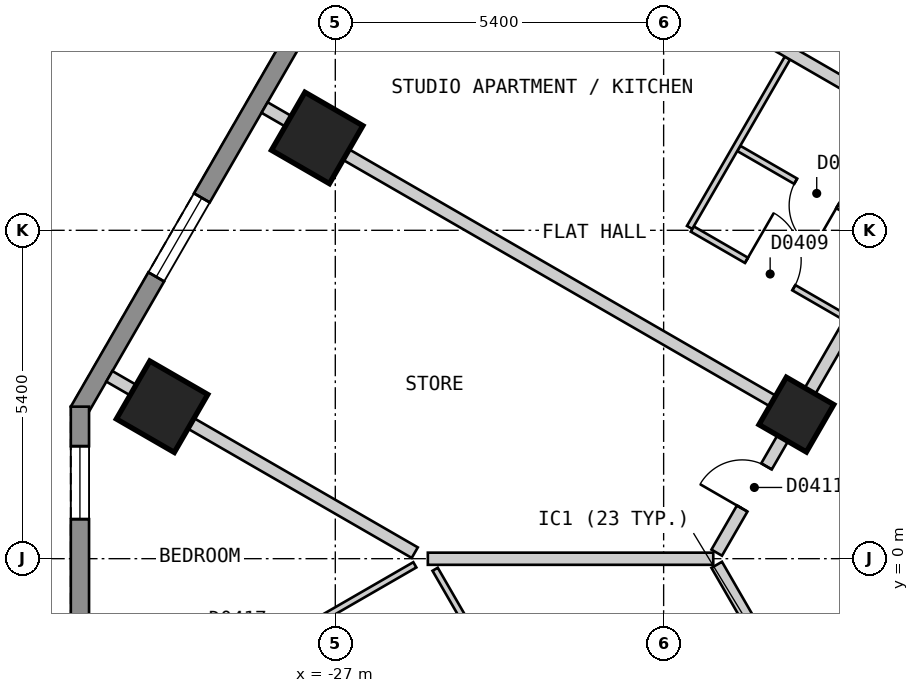
"""IFC4 building model, lengths in metres.
Left out: names, types, materials, properties, quantities, classifications, styles, units other than length and angle.
Written with IfcOpenShell. Run it as: python <this file> out.ifc"""

import sys

from ifc_helpers import new_model, si_unit, direction, frame, frame_2d, origin, origin_2d, place, context, subcontext, project, spatial, polyline, rectangle, outline, extrude, element, fill, save


model = new_model("IFC4")
c1 = context("Model", 3, precision=1e-05, world=origin(), true_north=direction((0.0, 1.0)))
c2 = subcontext(c1, "Body", "Model", "MODEL_VIEW")
j1 = project(units=[si_unit("LENGTHUNIT", "METRE"), si_unit("PLANEANGLEUNIT", "RADIAN")], contexts=[c1])
p1 = place(None, origin())
s1 = spatial("IfcSite", under=j1, at=p1, CompositionType="ELEMENT")
p2 = place(p1, origin())
s2 = spatial("IfcBuilding", under=s1, at=p2, CompositionType="ELEMENT")
p3 = place(p2, frame((0.0, 0.0, 32.4)))
s3 = spatial("IfcBuildingStorey", under=s2, at=p3, CompositionType="ELEMENT", Elevation=32.4)
for number, where, z_axis, x_axis in (
    (1, (-27.298, 6.919, 0.0), (0.0, 0.0, 1.0), (-0.5, -0.866, 0.0)),
    (2, (-29.849, 2.499, 0.0), (0.0, 0.0, 1.0), (-0.5, -0.866, 0.0)),
):
    element("IfcColumn", number, at=place(p3, frame(where, z_axis=z_axis, x_axis=x_axis)), inside=s3, PredefinedType="COLUMN", context=c2, shape_type="SweptSolid", body=[
        extrude(rectangle(XDim=1.1, YDim=1.1, at=origin_2d()), origin(), (0.0, 0.0, 1.0), 3.0),
    ])
p4 = place(p3, frame((-19.417, 2.369, 0.0), z_axis=(0.0, 0.0, 1.0), x_axis=(-0.499984884929, -0.866034130299, 0.0)))
e3 = element("IfcColumn", 3, at=p4, inside=s3, PredefinedType="COLUMN", context=c2, shape_type="SweptSolid", body=[
    extrude(rectangle(XDim=0.9, YDim=0.9, at=origin_2d()), origin(), (0.0, 0.0, 1.0), 3.0),
])
p5 = place(p3, frame((-17.71, 25.825, 0.0), z_axis=(0.0, 0.0, 1.0), x_axis=(-0.500001938803, -0.866024284413, 0.0)))
e4 = element("IfcWall", 4, at=p5, inside=s3, PredefinedType="SOLIDWALL", context=c2, shape_type="SweptSolid", body=[
    extrude(outline(polyline([(0.0, -0.15), (27.02, -0.15), (26.94, 0.15), (0.08, 0.15), (0.0, -0.15)])), origin(), (0.0, 0.0, 1.0), 2.7),
])
p6 = place(p5, frame((2.553, 0.0, 0.15)))
e5 = element("IfcOpeningElement", 5, at=p6, cuts=e4, PredefinedType="OPENING", context=c2, shape_type="SweptSolid", body=[
    extrude(rectangle(XDim=1.5, YDim=2.1, at=frame_2d((0.75, 1.05))), frame((0.0, 0.16, 0.0), z_axis=(0.0, -1.0, 0.0), x_axis=(1.0, 0.0, 0.0)), (0.0, 0.0, 1.0), 0.32),
])
p7 = place(p5, frame((7.658, 0.0, 0.15)))
e6 = element("IfcOpeningElement", 6, at=p7, cuts=e4, PredefinedType="OPENING", context=c2, shape_type="SweptSolid", body=[
    extrude(rectangle(XDim=1.5, YDim=2.1, at=frame_2d((0.75, 1.05))), frame((0.0, 0.16, 0.0), z_axis=(0.0, -1.0, 0.0), x_axis=(1.0, 0.0, 0.0)), (0.0, 0.0, 1.0), 0.32),
])
p8 = place(p5, frame((12.761, 0.0, 0.15)))
e7 = element("IfcOpeningElement", 7, at=p8, cuts=e4, PredefinedType="OPENING", context=c2, shape_type="SweptSolid", body=[
    extrude(rectangle(XDim=1.5, YDim=2.1, at=frame_2d((0.75, 1.05))), frame((0.0, 0.16, 0.0), z_axis=(0.0, -1.0, 0.0), x_axis=(1.0, 0.0, 0.0)), (0.0, 0.0, 1.0), 0.32),
])
p9 = place(p5, frame((17.865, 0.0, 0.15)))
e8 = element("IfcOpeningElement", 8, at=p9, cuts=e4, PredefinedType="OPENING", context=c2, shape_type="SweptSolid", body=[
    extrude(rectangle(XDim=1.5, YDim=2.1, at=frame_2d((0.75, 1.05))), frame((0.0, 0.16, 0.0), z_axis=(0.0, -1.0, 0.0), x_axis=(1.0, 0.0, 0.0)), (0.0, 0.0, 1.0), 0.32),
])
p10 = place(p5, frame((22.969, 0.0, 0.15)))
e9 = element("IfcOpeningElement", 9, at=p10, cuts=e4, PredefinedType="OPENING", context=c2, shape_type="SweptSolid", body=[
    extrude(rectangle(XDim=1.5, YDim=2.1, at=frame_2d((0.75, 1.05))), frame((0.0, 0.16, 0.0), z_axis=(0.0, -1.0, 0.0), x_axis=(1.0, 0.0, 0.0)), (0.0, 0.0, 1.0), 0.32),
])
p11 = place(p3, frame((-31.2, 2.5, 0.0), z_axis=(0.0, 0.0, 1.0), x_axis=(0.0, -1.0, 0.0)))
e10 = element("IfcWall", 10, at=p11, inside=s3, PredefinedType="SOLIDWALL", context=c2, shape_type="SweptSolid", body=[
    extrude(outline(polyline([(0.0, -0.15), (5.0, -0.15), (4.92, 0.15), (0.08, 0.15), (0.0, -0.15)])), origin(), (0.0, 0.0, 1.0), 2.7),
])
p12 = place(p11, frame((0.65, 0.0, 0.15)))
e11 = element("IfcOpeningElement", 11, at=p12, cuts=e10, PredefinedType="OPENING", context=c2, shape_type="SweptSolid", body=[
    extrude(rectangle(XDim=1.2, YDim=2.1, at=frame_2d((0.6, 1.05))), frame((0.0, 0.16, 0.0), z_axis=(0.0, -1.0, 0.0), x_axis=(1.0, 0.0, 0.0)), (0.0, 0.0, 1.0), 0.32),
])
p13 = place(p3, frame((-20.727, -0.101, 0.0), z_axis=(0.0, 0.0, 1.0), x_axis=(0.500049702773, -0.865996705973, 0.0)))
e12 = element("IfcWall", 12, at=p13, inside=s3, PredefinedType="PARTITIONING", context=c2, shape_type="SweptSolid", body=[
    extrude(rectangle(XDim=7.211, YDim=0.2, at=frame_2d((3.605, 0.0))), origin(), (0.0, 0.0, 1.0), 2.7),
])
p14 = place(p13, frame((5.654, 0.0, 0.0)))
e13 = element("IfcOpeningElement", 13, at=p14, cuts=e12, PredefinedType="OPENING", context=c2, shape_type="SweptSolid", body=[
    extrude(rectangle(XDim=1.0, YDim=2.1, at=frame_2d((0.5, 1.05))), frame((0.0, 0.11, 0.0), z_axis=(0.0, -1.0, 0.0), x_axis=(1.0, 0.0, 0.0)), (0.0, 0.0, 1.0), 0.22),
])
p15 = place(p3, frame((-20.727, 0.099, 0.0), z_axis=(0.0, 0.0, 1.0), x_axis=(0.499993204491, 0.866029327138, 0.0)))
e14 = element("IfcWall", 14, at=p15, inside=s3, PredefinedType="PARTITIONING", context=c2, shape_type="SweptSolid", body=[
    extrude(rectangle(XDim=20.554, YDim=0.2, at=frame_2d((10.277, 0.0))), origin(), (0.0, 0.0, 1.0), 2.7),
])
p16 = place(p15, frame((18.916, 0.0, 0.0)))
e15 = element("IfcOpeningElement", 15, at=p16, cuts=e14, PredefinedType="OPENING", context=c2, shape_type="SweptSolid", body=[
    extrude(rectangle(XDim=0.8, YDim=2.1, at=frame_2d((0.4, 1.05))), frame((0.0, 0.11, 0.0), z_axis=(0.0, -1.0, 0.0), x_axis=(1.0, 0.0, 0.0)), (0.0, 0.0, 1.0), 0.22),
])
p17 = place(p15, frame((14.88, 0.0, 0.0)))
e16 = element("IfcOpeningElement", 16, at=p17, cuts=e14, PredefinedType="OPENING", context=c2, shape_type="SweptSolid", body=[
    extrude(rectangle(XDim=1.0, YDim=2.1, at=frame_2d((0.5, 1.05))), frame((0.0, 0.11, 0.0), z_axis=(0.0, -1.0, 0.0), x_axis=(1.0, 0.0, 0.0)), (0.0, 0.0, 1.0), 0.22),
])
p18 = place(p15, frame((9.776, 0.0, 0.0)))
e17 = element("IfcOpeningElement", 17, at=p18, cuts=e14, PredefinedType="OPENING", context=c2, shape_type="SweptSolid", body=[
    extrude(rectangle(XDim=1.0, YDim=2.1, at=frame_2d((0.5, 1.05))), frame((0.0, 0.11, 0.0), z_axis=(0.0, -1.0, 0.0), x_axis=(1.0, 0.0, 0.0)), (0.0, 0.0, 1.0), 0.22),
])
p19 = place(p15, frame((4.673, 0.0, 0.0)))
e18 = element("IfcOpeningElement", 18, at=p19, cuts=e14, PredefinedType="OPENING", context=c2, shape_type="SweptSolid", body=[
    extrude(rectangle(XDim=1.0, YDim=2.1, at=frame_2d((0.5, 1.05))), frame((0.0, 0.11, 0.0), z_axis=(0.0, -1.0, 0.0), x_axis=(1.0, 0.0, 0.0)), (0.0, 0.0, 1.0), 0.22),
])
p20 = place(p15, frame((0.838, 0.0, 0.0)))
e19 = element("IfcOpeningElement", 19, at=p20, cuts=e14, PredefinedType="OPENING", context=c2, shape_type="SweptSolid", body=[
    extrude(rectangle(XDim=0.8, YDim=2.1, at=frame_2d((0.4, 1.05))), frame((0.0, 0.11, 0.0), z_axis=(0.0, -1.0, 0.0), x_axis=(1.0, 0.0, 0.0)), (0.0, 0.0, 1.0), 0.22),
])
p21 = place(p3, frame((-25.358, -0.174, 0.0), z_axis=(0.0, 0.0, 1.0), x_axis=(0.500093956194, -0.865971151354, 0.0)))
e20 = element("IfcWall", 20, at=p21, inside=s3, PredefinedType="PARTITIONING", context=c2, shape_type="SweptSolid", body=[
    extrude(rectangle(XDim=4.873, YDim=0.1, at=frame_2d((2.437, 0.0))), origin(), (0.0, 0.0, 1.0), 2.7),
])
p22 = place(p21, frame((1.937, 0.0, 0.0)))
e21 = element("IfcOpeningElement", 21, at=p22, cuts=e20, PredefinedType="OPENING", context=c2, shape_type="SweptSolid", body=[
    extrude(rectangle(XDim=0.8, YDim=2.1, at=frame_2d((0.4, 1.05))), frame((0.0, 0.06, 0.0), z_axis=(0.0, -1.0, 0.0), x_axis=(1.0, 0.0, 0.0)), (0.0, 0.0, 1.0), 0.12),
])
p23 = place(p3, frame((-20.364, 6.747, 0.0), z_axis=(0.0, 0.0, 1.0), x_axis=(0.866003949776, -0.500037157592, 0.0)))
e22 = element("IfcWall", 22, at=p23, inside=s3, PredefinedType="PARTITIONING", context=c2, shape_type="SweptSolid", body=[
    extrude(rectangle(XDim=2.91, YDim=0.1, at=frame_2d((1.455, 0.0))), origin(), (0.0, 0.0, 1.0), 2.7),
])
p24 = place(p23, frame((1.08, 0.0, 0.0)))
e23 = element("IfcOpeningElement", 23, at=p24, cuts=e22, PredefinedType="OPENING", context=c2, shape_type="SweptSolid", body=[
    extrude(rectangle(XDim=0.8, YDim=2.1, at=frame_2d((0.4, 1.05))), frame((0.0, 0.06, 0.0), z_axis=(0.0, -1.0, 0.0), x_axis=(1.0, 0.0, 0.0)), (0.0, 0.0, 1.0), 0.12),
])
p25 = place(p3, frame((-21.129, 5.421, 0.0), z_axis=(0.0, 0.0, 1.0), x_axis=(0.865935355752, -0.500155935342, 0.0)))
e24 = element("IfcWall", 24, at=p25, inside=s3, PredefinedType="PARTITIONING", context=c2, shape_type="SweptSolid", body=[
    extrude(rectangle(XDim=2.909, YDim=0.1, at=frame_2d((1.454, 0.0))), origin(), (0.0, 0.0, 1.0), 2.7),
])
p26 = place(p25, frame((1.029, 0.0, 0.0)))
e25 = element("IfcOpeningElement", 25, at=p26, cuts=e24, PredefinedType="OPENING", context=c2, shape_type="SweptSolid", body=[
    extrude(rectangle(XDim=0.9, YDim=2.1, at=frame_2d((0.45, 1.05))), frame((0.0, 0.06, 0.0), z_axis=(0.0, -1.0, 0.0), x_axis=(1.0, 0.0, 0.0)), (0.0, 0.0, 1.0), 0.12),
])
p27 = place(p3, frame((-21.173, 5.447, 0.0), z_axis=(0.0, 0.0, 1.0), x_axis=(0.500162542782, 0.865931539325, 0.0)))
e26 = element("IfcWall", 26, at=p27, inside=s3, PredefinedType="PARTITIONING", context=c2, shape_type="SweptSolid", body=[
    extrude(rectangle(XDim=3.217, YDim=0.1, at=frame_2d((1.609, 0.0))), origin(), (0.0, 0.0, 1.0), 2.7),
])
p28 = place(p3, frame((-30.715, -3.0, 0.0), z_axis=(0.0, 0.0, 1.0), x_axis=(0.866116197112, 0.49984270836, 0.0)))
e27 = element("IfcWall", 27, at=p28, inside=s3, PredefinedType="PARTITIONING", context=c2, shape_type="SweptSolid", body=[
    extrude(rectangle(XDim=5.8, YDim=0.1, at=frame_2d((2.9, 0.0))), origin(), (0.0, 0.0, 1.0), 2.7),
])
p29 = place(p28, frame((2.55, 0.0, 0.0)))
e28 = element("IfcOpeningElement", 28, at=p29, cuts=e27, PredefinedType="OPENING", context=c2, shape_type="SweptSolid", body=[
    extrude(rectangle(XDim=0.9, YDim=2.1, at=frame_2d((0.45, 1.05))), frame((0.0, 0.06, 0.0), z_axis=(0.0, -1.0, 0.0), x_axis=(1.0, 0.0, 0.0)), (0.0, 0.0, 1.0), 0.12),
])
p30 = place(p3, frame((-28.163, 7.419, 0.0), z_axis=(0.0, 0.0, 1.0), x_axis=(0.866022959057, -0.500004234368, 0.0)))
e29 = element("IfcWall", 29, at=p30, inside=s3, PredefinedType="PARTITIONING", context=c2, shape_type="SweptSolid", body=[
    extrude(rectangle(XDim=10.0, YDim=0.2, at=frame_2d((5.0, 0.0))), origin(), (0.0, 0.0, 1.0), 2.7),
])
p31 = place(p3, frame((-30.716, 2.999, 0.0), z_axis=(0.0, 0.0, 1.0), x_axis=(0.866032775405, -0.499987231761, 0.0)))
e30 = element("IfcWall", 30, at=p31, inside=s3, PredefinedType="PARTITIONING", context=c2, shape_type="SweptSolid", body=[
    extrude(rectangle(XDim=5.8, YDim=0.2, at=frame_2d((2.9, 0.0))), origin(), (0.0, 0.0, 1.0), 2.7),
])
p32 = place(p3, frame((-25.611, 11.839, 0.0), z_axis=(0.0, 0.0, 1.0), x_axis=(0.866022959057, -0.500004234368, 0.0)))
e31 = element("IfcWall", 31, at=p32, inside=s3, PredefinedType="PARTITIONING", context=c2, shape_type="SweptSolid", body=[
    extrude(rectangle(XDim=10.0, YDim=0.2, at=frame_2d((5.0, 0.0))), origin(), (0.0, 0.0, 1.0), 2.7),
])
p33 = place(p3, frame((-25.478, -0.001, 0.0), z_axis=(0.0, 0.0, 1.0), x_axis=(1.0, 0.0, 0.0)))
e32 = element("IfcWall", 32, at=p33, inside=s3, PredefinedType="PARTITIONING", context=c2, shape_type="SweptSolid", body=[
    extrude(rectangle(XDim=4.694, YDim=0.2, at=frame_2d((2.347, 0.0))), origin(), (0.0, 0.0, 1.0), 2.7),
])
p34 = place(p10, origin())
e33 = element("IfcWindow", 33, at=p34, inside=s3, PartitioningType="SINGLE_PANEL", PredefinedType="WINDOW", context=c2, shape_type="SweptSolid", body=[
    extrude(rectangle(XDim=1.5, YDim=2.1, at=frame_2d((0.75, 1.05))), frame((0.0, 0.03, 0.0), z_axis=(0.0, -1.0, 0.0), x_axis=(1.0, 0.0, 0.0)), (0.0, 0.0, 1.0), 0.06),
])
fill(e9, e33)
p35 = place(p12, origin())
e34 = element("IfcWindow", 34, at=p35, inside=s3, PartitioningType="SINGLE_PANEL", PredefinedType="WINDOW", context=c2, shape_type="SweptSolid", body=[
    extrude(rectangle(XDim=1.2, YDim=2.1, at=frame_2d((0.6, 1.05))), frame((0.0, 0.03, 0.0), z_axis=(0.0, -1.0, 0.0), x_axis=(1.0, 0.0, 0.0)), (0.0, 0.0, 1.0), 0.06),
])
fill(e11, e34)
p36 = place(p26, origin())
e35 = element("IfcDoor", 35, at=p36, inside=s3, OperationType="SINGLE_SWING_LEFT", PredefinedType="DOOR", context=c2, shape_type="SweptSolid", body=[
    extrude(rectangle(XDim=0.9, YDim=2.1, at=frame_2d((0.45, 1.05))), frame((0.0, 0.025, 0.0), z_axis=(0.0, -1.0, 0.0), x_axis=(1.0, 0.0, 0.0)), (0.0, 0.0, 1.0), 0.05),
])
fill(e25, e35)
p37 = place(p24, origin())
e36 = element("IfcDoor", 36, at=p37, inside=s3, OperationType="SINGLE_SWING_RIGHT", PredefinedType="DOOR", context=c2, shape_type="SweptSolid", body=[
    extrude(rectangle(XDim=0.8, YDim=2.1, at=frame_2d((0.4, 1.05))), frame((0.0, 0.025, 0.0), z_axis=(0.0, -1.0, 0.0), x_axis=(1.0, 0.0, 0.0)), (0.0, 0.0, 1.0), 0.05),
])
fill(e23, e36)
p38 = place(p20, origin())
e37 = element("IfcDoor", 37, at=p38, inside=s3, OperationType="SINGLE_SWING_LEFT", PredefinedType="DOOR", context=c2, shape_type="SweptSolid", body=[
    extrude(rectangle(XDim=0.8, YDim=2.1, at=frame_2d((0.4, 1.05))), frame((0.0, 0.025, 0.0), z_axis=(0.0, -1.0, 0.0), x_axis=(1.0, 0.0, 0.0)), (0.0, 0.0, 1.0), 0.05),
])
fill(e19, e37)
save(model, sys.argv[1])
